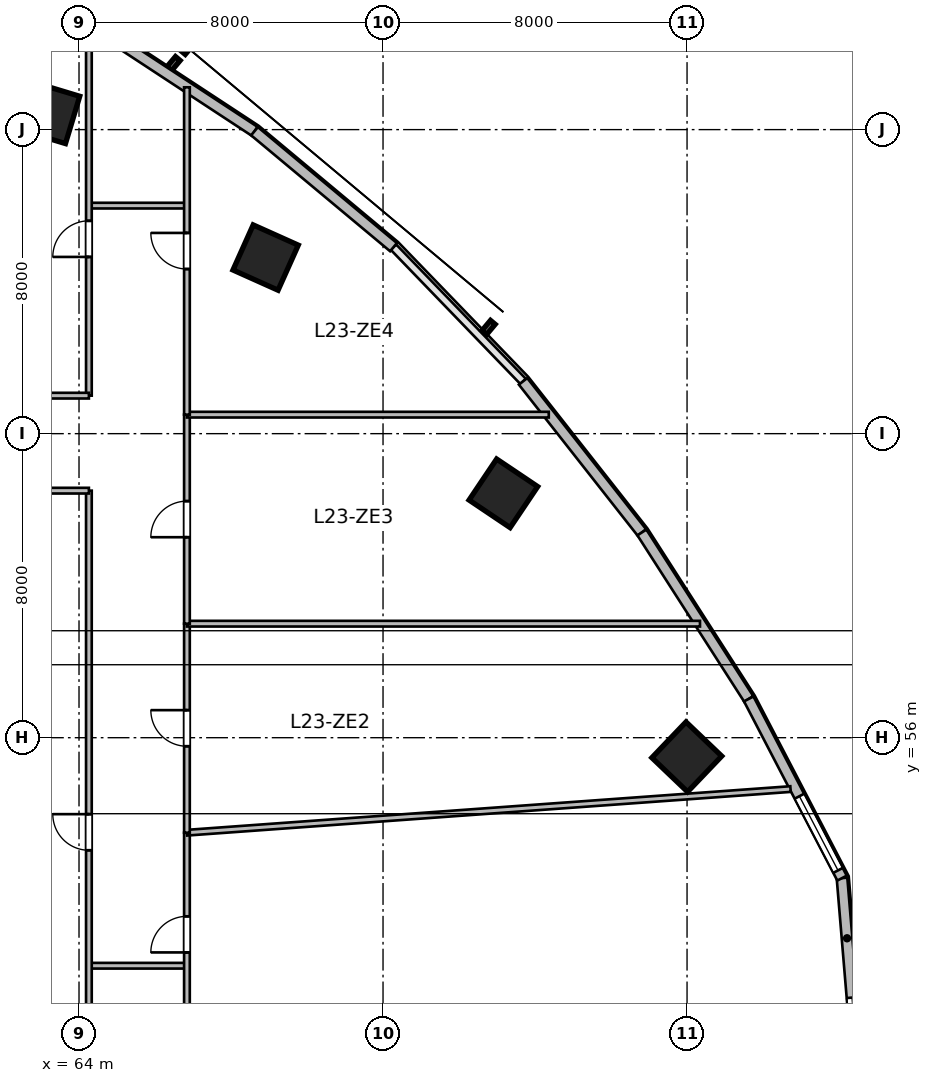
"""IFC4 building model, lengths in metres.
Left out: names, types, materials, properties, quantities, classifications, styles, units other than length and angle.
Written with IfcOpenShell. Run it as: python <this file> out.ifc"""

import sys

from ifc_helpers import new_model, si_unit, direction, frame, frame_2d, origin, origin_2d, place, context, subcontext, project, spatial, rectangle, extrude, source, transform, mapped, element, fill, save


model = new_model("IFC4")
c1 = context("Model", 3, precision=1e-05, world=origin(), true_north=direction((0.0, 1.0)))
c2 = subcontext(c1, "Body", "Model", "MODEL_VIEW")
j1 = project(units=[si_unit("LENGTHUNIT", "METRE"), si_unit("PLANEANGLEUNIT", "RADIAN")], contexts=[c1])
p1 = place(None, origin())
s1 = spatial("IfcSite", under=j1, at=p1, CompositionType="ELEMENT")
p2 = place(p1, origin())
s2 = spatial("IfcBuilding", under=s1, at=p2, CompositionType="ELEMENT")
p3 = place(p2, frame((0.0, 0.0, 99.9)))
s3 = spatial("IfcBuildingStorey", under=s2, at=p3, CompositionType="ELEMENT", Elevation=99.9)
m1 = source(origin(), c2, "Body", "SweptSolid", [
    extrude(rectangle(XDim=1.3, YDim=1.3, at=origin_2d()), origin(), (0.0, 0.0, 1.0), 3.9),
])
for number, where, z_axis, x_axis in (
    (1, (63.209, 72.442, 0.0), (0.0, 0.0, 1.0), (0.289, 0.957, 0.0)),
    (2, (68.91, 68.633, 0.0), (0.0, 0.0, 1.0), (0.409, 0.912, 0.0)),
    (3, (75.167, 62.43, 0.0), (0.0, 0.0, 1.0), (0.558, 0.83, 0.0)),
    (4, (79.993, 55.494, 0.0), (0.0, 0.0, 1.0), (0.691, 0.723, 0.0)),
):
    element("IfcColumn", number, at=place(p3, frame(where, z_axis=z_axis, x_axis=x_axis)), inside=s3, PredefinedType="COLUMN", context=c2, shape_type="MappedRepresentation", body=[
        mapped(m1, transform((0.0, 0.0, 0.0), scale=1.0)),
    ])
m2 = source(origin(), c2, "Body", "SweptSolid", [
    extrude(rectangle(XDim=5.674, YDim=0.28, at=frame_2d((2.837, 0.0))), origin(), (0.0, 0.0, 1.0), 3.65),
])
p4 = place(p3, frame((84.078, 52.305, 0.0), z_axis=(0.0, 0.0, 1.0), x_axis=(0.083309007867, -0.996523762491, 0.0)))
e5 = element("IfcWall", 5, at=p4, inside=s3, PredefinedType="SOLIDWALL", context=c2, shape_type="MappedRepresentation", body=[
    mapped(m2, transform((0.0, 0.0, 0.0), scale=1.0)),
])
p5 = place(p4, frame((3.155, 0.0, 0.95)))
e6 = element("IfcOpeningElement", 6, at=p5, cuts=e5, PredefinedType="OPENING", context=c2, shape_type="SweptSolid", body=[
    extrude(rectangle(XDim=2.2, YDim=2.1, at=frame_2d((1.1, 1.05))), frame((0.0, 0.15, 0.0), z_axis=(0.0, -1.0, 0.0), x_axis=(1.0, 0.0, 0.0)), (0.0, 0.0, 1.0), 0.3),
])
m3 = source(origin(), c2, "Body", "SweptSolid", [
    extrude(rectangle(XDim=4.626, YDim=0.28, at=frame_2d((2.313, 0.0))), origin(), (0.0, 0.0, 1.0), 3.65),
])
p6 = place(p3, frame((64.751, 74.496, 0.0), z_axis=(0.0, 0.0, 1.0), x_axis=(0.83595938331, -0.548791316855, 0.0)))
e7 = element("IfcWall", 7, at=p6, inside=s3, PredefinedType="SOLIDWALL", context=c2, shape_type="MappedRepresentation", body=[
    mapped(m3, transform((0.0, 0.0, 0.0), scale=1.0)),
])
m4 = source(origin(), c2, "Body", "SweptSolid", [
    extrude(rectangle(XDim=4.762, YDim=0.28, at=frame_2d((2.381, 0.0))), origin(), (0.0, 0.0, 1.0), 3.65),
])
p7 = place(p3, frame((68.618, 71.958, 0.0), z_axis=(0.0, 0.0, 1.0), x_axis=(0.767952279762, -0.640507061638, 0.0)))
e8 = element("IfcWall", 8, at=p7, inside=s3, PredefinedType="SOLIDWALL", context=c2, shape_type="MappedRepresentation", body=[
    mapped(m4, transform((0.0, 0.0, 0.0), scale=1.0)),
])
m5 = source(origin(), c2, "Body", "SweptSolid", [
    extrude(rectangle(XDim=5.058, YDim=0.28, at=frame_2d((2.529, 0.0))), origin(), (0.0, 0.0, 1.0), 3.65),
])
p8 = place(p3, frame((75.685, 65.376, 0.0), z_axis=(0.0, 0.0, 1.0), x_axis=(0.618145507434, -0.786063694391, 0.0)))
e9 = element("IfcWall", 9, at=p8, inside=s3, PredefinedType="SOLIDWALL", context=c2, shape_type="MappedRepresentation", body=[
    mapped(m5, transform((0.0, 0.0, 0.0), scale=1.0)),
])
m6 = source(origin(), c2, "Body", "SweptSolid", [
    extrude(rectangle(XDim=5.205, YDim=0.28, at=frame_2d((2.603, 0.0))), origin(), (0.0, 0.0, 1.0), 3.65),
])
p9 = place(p3, frame((78.812, 61.4, 0.0), z_axis=(0.0, 0.0, 1.0), x_axis=(0.540188528895, -0.8415440293, 0.0)))
e10 = element("IfcWall", 10, at=p9, inside=s3, PredefinedType="SOLIDWALL", context=c2, shape_type="MappedRepresentation", body=[
    mapped(m6, transform((0.0, 0.0, 0.0), scale=1.0)),
])
m7 = source(origin(), c2, "Body", "SweptSolid", [
    extrude(rectangle(XDim=5.315, YDim=0.28, at=frame_2d((2.658, 0.0))), origin(), (0.0, 0.0, 1.0), 3.65),
])
p10 = place(p3, frame((81.623, 57.02, 0.0), z_axis=(0.0, 0.0, 1.0), x_axis=(0.461760527822, -0.887004630735, 0.0)))
e11 = element("IfcWall", 11, at=p10, inside=s3, PredefinedType="SOLIDWALL", context=c2, shape_type="MappedRepresentation", body=[
    mapped(m7, transform((0.0, 0.0, 0.0), scale=1.0)),
])
p11 = place(p10, frame((2.886, 0.0, 0.95)))
e12 = element("IfcOpeningElement", 12, at=p11, cuts=e11, PredefinedType="OPENING", context=c2, shape_type="SweptSolid", body=[
    extrude(rectangle(XDim=2.2, YDim=2.1, at=frame_2d((1.1, 1.05))), frame((0.0, 0.15, 0.0), z_axis=(0.0, -1.0, 0.0), x_axis=(1.0, 0.0, 0.0)), (0.0, 0.0, 1.0), 0.3),
])
m8 = source(origin(), c2, "Body", "SweptSolid", [
    extrude(rectangle(XDim=2.5, YDim=0.15, at=frame_2d((1.25, 0.0))), origin(), (0.0, 0.0, 1.0), 3.65),
])
for number, where, z_axis, x_axis in (
    (13, (64.3, 50.0, 0.0), (0.0, 0.0, 1.0), (1.0, 0.0, 0.0)),
    (14, (64.3, 70.0, 0.0), (0.0, 0.0, 1.0), (1.0, 0.0, 0.0)),
):
    element("IfcWall", number, at=place(p3, frame(where, z_axis=z_axis, x_axis=x_axis)), inside=s3, PredefinedType="PARTITIONING", context=c2, shape_type="MappedRepresentation", body=[
        mapped(m8, transform((0.0, 0.0, 0.0), scale=1.0)),
    ])
m9 = source(origin(), c2, "Body", "SweptSolid", [
    extrude(rectangle(XDim=12.894, YDim=0.15, at=frame_2d((6.447, 0.0))), origin(), (0.0, 0.0, 1.0), 2.942),
])
p12 = place(p3, frame((66.84, 40.606, 0.0), z_axis=(0.0, 0.0, 1.0), x_axis=(0.0, 1.0, 0.0)))
e15 = element("IfcWall", 15, at=p12, inside=s3, PredefinedType="PARTITIONING", context=c2, shape_type="MappedRepresentation", body=[
    mapped(m9, transform((0.0, 0.0, 0.0), scale=1.0)),
])
p13 = place(p12, frame((9.744, 0.0, 0.0)))
e16 = element("IfcOpeningElement", 16, at=p13, cuts=e15, PredefinedType="OPENING", context=c2, shape_type="SweptSolid", body=[
    extrude(rectangle(XDim=0.95, YDim=2.1, at=frame_2d((0.475, 1.05))), frame((0.0, 0.085, 0.0), z_axis=(0.0, -1.0, 0.0), x_axis=(1.0, 0.0, 0.0)), (0.0, 0.0, 1.0), 0.17),
])
m10 = source(origin(), c2, "Body", "SweptSolid", [
    extrude(rectangle(XDim=15.924, YDim=0.15, at=frame_2d((7.962, 0.0))), origin(), (0.0, 0.0, 1.0), 3.65),
])
p14 = place(p3, frame((66.84, 53.5, 0.0), z_axis=(0.0, 0.0, 1.0), x_axis=(0.997397082693, 0.072104503572, 0.0)))
e17 = element("IfcWall", 17, at=p14, inside=s3, PredefinedType="PARTITIONING", context=c2, shape_type="MappedRepresentation", body=[
    mapped(m10, transform((0.0, 0.0, 0.0), scale=1.0)),
])
m11 = source(origin(), c2, "Body", "SweptSolid", [
    extrude(rectangle(XDim=5.5, YDim=0.15, at=frame_2d((2.75, 0.0))), origin(), (0.0, 0.0, 1.0), 3.022),
])
p15 = place(p3, frame((66.84, 53.5, 0.0), z_axis=(0.0, 0.0, 1.0), x_axis=(0.0, 1.0, 0.0)))
e18 = element("IfcWall", 18, at=p15, inside=s3, PredefinedType="PARTITIONING", context=c2, shape_type="MappedRepresentation", body=[
    mapped(m11, transform((0.0, 0.0, 0.0), scale=1.0)),
])
p16 = place(p15, frame((2.275, 0.0, 0.0)))
e19 = element("IfcOpeningElement", 19, at=p16, cuts=e18, PredefinedType="OPENING", context=c2, shape_type="SweptSolid", body=[
    extrude(rectangle(XDim=0.95, YDim=2.1, at=frame_2d((0.475, 1.05))), frame((0.0, 0.085, 0.0), z_axis=(0.0, -1.0, 0.0), x_axis=(1.0, 0.0, 0.0)), (0.0, 0.0, 1.0), 0.17),
])
m12 = source(origin(), c2, "Body", "SweptSolid", [
    extrude(rectangle(XDim=13.5, YDim=0.15, at=frame_2d((6.75, 0.0))), origin(), (0.0, 0.0, 1.0), 3.65),
])
p17 = place(p3, frame((66.84, 59.0, 0.0), z_axis=(0.0, 0.0, 1.0), x_axis=(1.0, 0.0, 0.0)))
e20 = element("IfcWall", 20, at=p17, inside=s3, PredefinedType="PARTITIONING", context=c2, shape_type="MappedRepresentation", body=[
    mapped(m12, transform((0.0, 0.0, 0.0), scale=1.0)),
])
m13 = source(origin(), c2, "Body", "SweptSolid", [
    extrude(rectangle(XDim=5.5, YDim=0.15, at=frame_2d((2.75, 0.0))), origin(), (0.0, 0.0, 1.0), 2.942),
])
p18 = place(p3, frame((66.84, 59.0, 0.0), z_axis=(0.0, 0.0, 1.0), x_axis=(0.0, 1.0, 0.0)))
e21 = element("IfcWall", 21, at=p18, inside=s3, PredefinedType="PARTITIONING", context=c2, shape_type="MappedRepresentation", body=[
    mapped(m13, transform((0.0, 0.0, 0.0), scale=1.0)),
])
p19 = place(p18, frame((2.275, 0.0, 0.0)))
e22 = element("IfcOpeningElement", 22, at=p19, cuts=e21, PredefinedType="OPENING", context=c2, shape_type="SweptSolid", body=[
    extrude(rectangle(XDim=0.95, YDim=2.1, at=frame_2d((0.475, 1.05))), frame((0.0, 0.085, 0.0), z_axis=(0.0, -1.0, 0.0), x_axis=(1.0, 0.0, 0.0)), (0.0, 0.0, 1.0), 0.17),
])
m14 = source(origin(), c2, "Body", "SweptSolid", [
    extrude(rectangle(XDim=9.521, YDim=0.15, at=frame_2d((4.761, 0.0))), origin(), (0.0, 0.0, 1.0), 3.65),
])
p20 = place(p3, frame((66.84, 64.5, 0.0), z_axis=(0.0, 0.0, 1.0), x_axis=(1.0, 0.0, 0.0)))
e23 = element("IfcWall", 23, at=p20, inside=s3, PredefinedType="PARTITIONING", context=c2, shape_type="MappedRepresentation", body=[
    mapped(m14, transform((0.0, 0.0, 0.0), scale=1.0)),
])
m15 = source(origin(), c2, "Body", "SweptSolid", [
    extrude(rectangle(XDim=8.613, YDim=0.15, at=frame_2d((4.307, 0.0))), origin(), (0.0, 0.0, 1.0), 3.65),
])
p21 = place(p3, frame((66.84, 64.5, 0.0), z_axis=(0.0, 0.0, 1.0), x_axis=(0.0, 1.0, 0.0)))
e24 = element("IfcWall", 24, at=p21, inside=s3, PredefinedType="PARTITIONING", context=c2, shape_type="MappedRepresentation", body=[
    mapped(m15, transform((0.0, 0.0, 0.0), scale=1.0)),
])
p22 = place(p21, frame((3.832, 0.0, 0.0)))
e25 = element("IfcOpeningElement", 25, at=p22, cuts=e24, PredefinedType="OPENING", context=c2, shape_type="SweptSolid", body=[
    extrude(rectangle(XDim=0.95, YDim=2.1, at=frame_2d((0.475, 1.05))), frame((0.0, 0.085, 0.0), z_axis=(0.0, -1.0, 0.0), x_axis=(1.0, 0.0, 0.0)), (0.0, 0.0, 1.0), 0.17),
])
m16 = source(origin(), c2, "Body", "SweptSolid", [
    extrude(rectangle(XDim=17.974, YDim=0.15, at=frame_2d((8.987, 0.0))), origin(), (0.0, 0.0, 1.0), 2.942),
])
p23 = place(p3, frame((64.26, 44.526, 0.0), z_axis=(0.0, 0.0, 1.0), x_axis=(0.0, 1.0, 0.0)))
e26 = element("IfcWall", 26, at=p23, inside=s3, PredefinedType="PARTITIONING", context=c2, shape_type="MappedRepresentation", body=[
    mapped(m16, transform((0.0, 0.0, 0.0), scale=1.0)),
])
p24 = place(p23, frame((8.512, 0.0, 0.0)))
e27 = element("IfcOpeningElement", 27, at=p24, cuts=e26, PredefinedType="OPENING", context=c2, shape_type="SweptSolid", body=[
    extrude(rectangle(XDim=0.95, YDim=2.1, at=frame_2d((0.475, 1.05))), frame((0.0, 0.085, 0.0), z_axis=(0.0, -1.0, 0.0), x_axis=(1.0, 0.0, 0.0)), (0.0, 0.0, 1.0), 0.17),
])
m17 = source(origin(), c2, "Body", "SweptSolid", [
    extrude(rectangle(XDim=4.76, YDim=0.15, at=frame_2d((2.38, 0.0))), origin(), (0.0, 0.0, 1.0), 3.65),
])
p25 = place(p3, frame((59.5, 62.5, 0.0), z_axis=(0.0, 0.0, 1.0), x_axis=(1.0, 0.0, 0.0)))
e28 = element("IfcWall", 28, at=p25, inside=s3, PredefinedType="PARTITIONING", context=c2, shape_type="MappedRepresentation", body=[
    mapped(m17, transform((0.0, 0.0, 0.0), scale=1.0)),
])
m18 = source(origin(), c2, "Body", "SweptSolid", [
    extrude(rectangle(XDim=9.729, YDim=0.15, at=frame_2d((4.864, 0.0))), origin(), (0.0, 0.0, 1.0), 3.65),
])
p26 = place(p3, frame((64.26, 65.0, 0.0), z_axis=(0.0, 0.0, 1.0), x_axis=(0.0, 1.0, 0.0)))
e29 = element("IfcWall", 29, at=p26, inside=s3, PredefinedType="PARTITIONING", context=c2, shape_type="MappedRepresentation", body=[
    mapped(m18, transform((0.0, 0.0, 0.0), scale=1.0)),
])
p27 = place(p26, frame((3.65, 0.0, 0.0)))
e30 = element("IfcOpeningElement", 30, at=p27, cuts=e29, PredefinedType="OPENING", context=c2, shape_type="SweptSolid", body=[
    extrude(rectangle(XDim=0.95, YDim=2.1, at=frame_2d((0.475, 1.05))), frame((0.0, 0.085, 0.0), z_axis=(0.0, -1.0, 0.0), x_axis=(1.0, 0.0, 0.0)), (0.0, 0.0, 1.0), 0.17),
])
m19 = source(origin(), c2, "Body", "SweptSolid", [
    extrude(rectangle(XDim=2.66, YDim=0.15, at=frame_2d((1.33, 0.0))), origin(), (0.0, 0.0, 1.0), 3.65),
])
p28 = place(p3, frame((61.6, 65.0, 0.0), z_axis=(0.0, 0.0, 1.0), x_axis=(1.0, 0.0, 0.0)))
e31 = element("IfcWall", 31, at=p28, inside=s3, PredefinedType="PARTITIONING", context=c2, shape_type="MappedRepresentation", body=[
    mapped(m19, transform((0.0, 0.0, 0.0), scale=1.0)),
])
m20 = source(origin(), c2, "Body", "SweptSolid", [
    extrude(rectangle(XDim=2.2, YDim=2.1, at=frame_2d((1.1, 1.05))), frame((0.0, 0.03, 0.0), z_axis=(0.0, -1.0, 0.0), x_axis=(1.0, 0.0, 0.0)), (0.0, 0.0, 1.0), 0.06),
])
p29 = place(p5, origin())
e32 = element("IfcWindow", 32, at=p29, inside=s3, PartitioningType="TRIPLE_PANEL_VERTICAL", PredefinedType="WINDOW", context=c2, shape_type="MappedRepresentation", body=[
    mapped(m20, transform((0.0, 0.0, 0.0), scale=1.0)),
])
fill(e6, e32)
p30 = place(p11, origin())
e33 = element("IfcWindow", 33, at=p30, inside=s3, PartitioningType="TRIPLE_PANEL_VERTICAL", PredefinedType="WINDOW", context=c2, shape_type="MappedRepresentation", body=[
    mapped(m20, transform((0.0, 0.0, 0.0), scale=1.0)),
])
fill(e12, e33)
m21 = source(origin(), c2, "Body", "SweptSolid", [
    extrude(rectangle(XDim=0.95, YDim=2.1, at=frame_2d((0.475, 1.05))), frame((0.0, 0.025, 0.0), z_axis=(0.0, -1.0, 0.0), x_axis=(1.0, 0.0, 0.0)), (0.0, 0.0, 1.0), 0.05),
])
p31 = place(p13, origin())
e34 = element("IfcDoor", 34, at=p31, inside=s3, OperationType="SINGLE_SWING_LEFT", PredefinedType="DOOR", context=c2, shape_type="MappedRepresentation", body=[
    mapped(m21, transform((0.0, 0.0, 0.0), scale=1.0)),
])
fill(e16, e34)
p32 = place(p16, origin())
e35 = element("IfcDoor", 35, at=p32, inside=s3, OperationType="SINGLE_SWING_RIGHT", PredefinedType="DOOR", context=c2, shape_type="MappedRepresentation", body=[
    mapped(m21, transform((0.0, 0.0, 0.0), scale=1.0)),
])
fill(e19, e35)
p33 = place(p19, origin())
e36 = element("IfcDoor", 36, at=p33, inside=s3, OperationType="SINGLE_SWING_LEFT", PredefinedType="DOOR", context=c2, shape_type="MappedRepresentation", body=[
    mapped(m21, transform((0.0, 0.0, 0.0), scale=1.0)),
])
fill(e22, e36)
p34 = place(p22, origin())
e37 = element("IfcDoor", 37, at=p34, inside=s3, OperationType="SINGLE_SWING_RIGHT", PredefinedType="DOOR", context=c2, shape_type="MappedRepresentation", body=[
    mapped(m21, transform((0.0, 0.0, 0.0), scale=1.0)),
])
fill(e25, e37)
p35 = place(p24, origin())
e38 = element("IfcDoor", 38, at=p35, inside=s3, OperationType="SINGLE_SWING_RIGHT", PredefinedType="DOOR", context=c2, shape_type="MappedRepresentation", body=[
    mapped(m21, transform((0.0, 0.0, 0.0), scale=1.0)),
])
fill(e27, e38)
p36 = place(p27, origin())
e39 = element("IfcDoor", 39, at=p36, inside=s3, OperationType="SINGLE_SWING_LEFT", PredefinedType="DOOR", context=c2, shape_type="MappedRepresentation", body=[
    mapped(m21, transform((0.0, 0.0, 0.0), scale=1.0)),
])
fill(e30, e39)
save(model, sys.argv[1])
